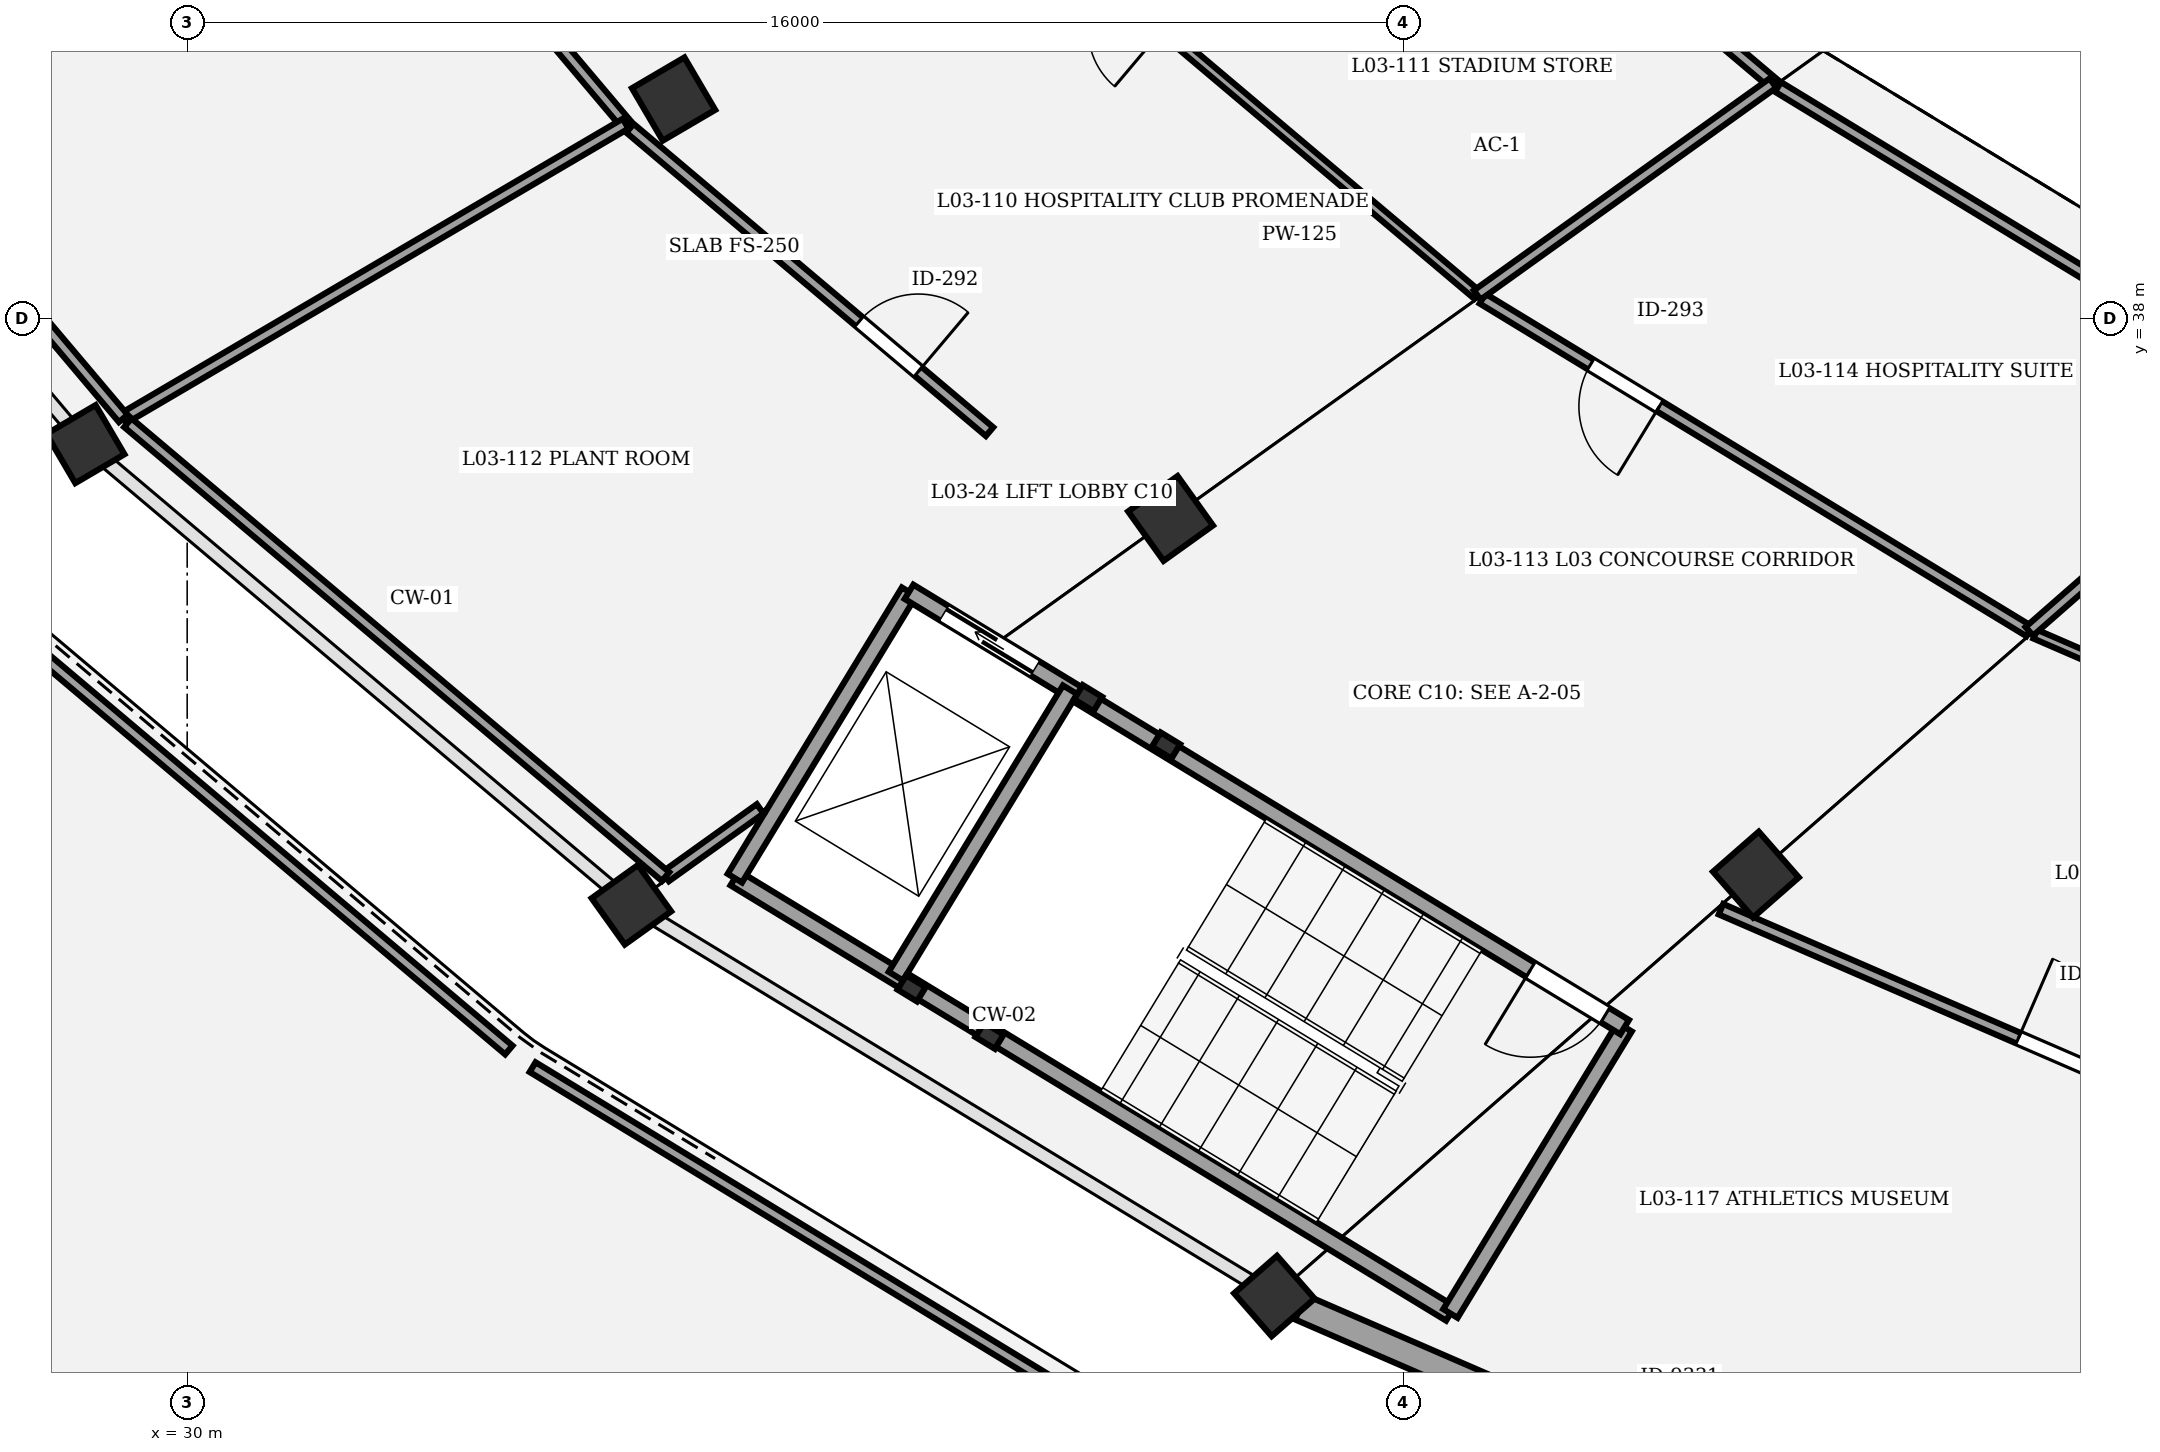
"""IFC4 building model, lengths in metres.
Left out: names, types, materials, properties, quantities, classifications, styles, units other than length and angle.
Written with IfcOpenShell. Run it as: python <this file> out.ifc"""

import sys

from ifc_helpers import new_model, si_unit, direction, frame, frame_2d, origin, origin_2d, place, context, subcontext, project, spatial, rectangle, extrude, element, fill, save


model = new_model("IFC4")
c1 = context("Model", 3, precision=1e-05, world=origin(), true_north=direction((0.0, 1.0)))
c2 = subcontext(c1, "Body", "Model", "MODEL_VIEW")
j1 = project(units=[si_unit("LENGTHUNIT", "METRE"), si_unit("PLANEANGLEUNIT", "RADIAN")], contexts=[c1])
p1 = place(None, origin())
s1 = spatial("IfcSite", under=j1, at=p1, CompositionType="ELEMENT")
p2 = place(p1, origin())
s2 = spatial("IfcBuilding", under=s1, at=p2, CompositionType="ELEMENT")
p3 = place(p2, frame((0.0, 0.0, 14.7)))
s3 = spatial("IfcBuildingStorey", under=s2, at=p3, CompositionType="ELEMENT", Elevation=14.7)
p4 = place(p3, frame((36.4, 40.886, 0.0), z_axis=(0.0, 0.0, 1.0), x_axis=(-0.862513669207, -0.506033764121, 0.0)))
e1 = element("IfcColumn", 1, at=p4, inside=s3, PredefinedType="COLUMN", context=c2, shape_type="SweptSolid", body=[
    extrude(rectangle(XDim=0.8, YDim=0.8, at=origin_2d()), origin(), (0.0, 0.0, 1.0), 4.5),
])
p5 = place(p3, frame((28.662, 36.346, 0.0), z_axis=(0.0, 0.0, 1.0), x_axis=(-0.862513669207, -0.506033764121, 0.0)))
e2 = element("IfcColumn", 2, at=p5, inside=s3, PredefinedType="COLUMN", context=c2, shape_type="SweptSolid", body=[
    extrude(rectangle(XDim=0.75, YDim=0.75, at=origin_2d()), origin(), (0.0, 0.0, 1.0), 4.5),
])
p6 = place(p3, frame((42.939, 35.368, 0.0), z_axis=(0.0, 0.0, 1.0), x_axis=(-0.812897512265, -0.582406760395, 0.0)))
e3 = element("IfcColumn", 3, at=p6, inside=s3, PredefinedType="COLUMN", context=c2, shape_type="SweptSolid", body=[
    extrude(rectangle(XDim=0.8, YDim=0.8, at=origin_2d()), origin(), (0.0, 0.0, 1.0), 4.5),
])
p7 = place(p3, frame((35.844, 30.285, 0.0), z_axis=(0.0, 0.0, 1.0), x_axis=(-0.812897512265, -0.582406760395, 0.0)))
e4 = element("IfcColumn", 4, at=p7, inside=s3, PredefinedType="COLUMN", context=c2, shape_type="SweptSolid", body=[
    extrude(rectangle(XDim=0.75, YDim=0.75, at=origin_2d()), origin(), (0.0, 0.0, 1.0), 4.5),
])
p8 = place(p3, frame((50.64, 30.683, 0.0), z_axis=(0.0, 0.0, 1.0), x_axis=(-0.752529860433, -0.658558128912, 0.0)))
e5 = element("IfcColumn", 5, at=p8, inside=s3, PredefinedType="COLUMN", context=c2, shape_type="SweptSolid", body=[
    extrude(rectangle(XDim=0.8, YDim=0.8, at=origin_2d()), origin(), (0.0, 0.0, 1.0), 4.5),
])
p9 = place(p3, frame((44.304, 25.139, 0.0), z_axis=(0.0, 0.0, 1.0), x_axis=(-0.752529860433, -0.658558128912, 0.0)))
e6 = element("IfcColumn", 6, at=p9, inside=s3, PredefinedType="COLUMN", context=c2, shape_type="SweptSolid", body=[
    extrude(rectangle(XDim=0.75, YDim=0.75, at=origin_2d()), origin(), (0.0, 0.0, 1.0), 4.5),
])
p10 = place(p3, frame((53.72, 21.057, 0.0), z_axis=(0.0, 0.0, 1.0), x_axis=(-0.917502782842, 0.397729359587, 0.0)))
e7 = element("IfcWall", 7, at=p10, inside=s3, PredefinedType="STANDARD", context=c2, shape_type="SweptSolid", body=[
    extrude(rectangle(XDim=9.89, YDim=0.35, at=frame_2d((4.945, 0.0))), origin(), (0.0, 0.0, 1.0), 3.42),
])
p11 = place(p10, frame((4.045, 0.0, 0.0)))
e8 = element("IfcOpeningElement", 8, at=p11, cuts=e7, PredefinedType="OPENING", context=c2, shape_type="SweptSolid", body=[
    extrude(rectangle(XDim=1.8, YDim=2.4, at=frame_2d((0.9, 1.2))), frame((0.0, 0.185, 0.0), z_axis=(0.0, -1.0, 0.0), x_axis=(1.0, 0.0, 0.0)), (0.0, 0.0, 1.0), 0.37),
])
for number, where, z_axis, x_axis in (
    (9, (42.879, 32.382, 0.0), (0.0, 0.0, 1.0), (-0.854, 0.52, 0.0)),
    (10, (41.854, 33.005, 0.0), (0.0, 0.0, 1.0), (-0.854, 0.52, 0.0)),
    (11, (39.531, 29.186, 0.0), (0.0, 0.0, 1.0), (-0.854, 0.52, 0.0)),
    (12, (40.556, 28.562, 0.0), (0.0, 0.0, 1.0), (-0.854, 0.52, 0.0)),
):
    element("IfcColumn", number, at=place(p3, frame(where, z_axis=z_axis, x_axis=x_axis)), inside=s3, PredefinedType="COLUMN", context=c2, shape_type="SweptSolid", body=[
        extrude(rectangle(XDim=0.3, YDim=0.22, at=origin_2d()), origin(), (0.0, 0.0, 1.0), 4.5),
    ])
p12 = place(p3, frame((46.621, 24.909, 0.0), z_axis=(0.0, 0.0, 1.0), x_axis=(-0.854373055797, 0.519660159651, 0.0)))
e13 = element("IfcWall", 13, at=p12, inside=s3, PredefinedType="SHEAR", context=c2, shape_type="SweptSolid", body=[
    extrude(rectangle(XDim=11.02, YDim=0.22, at=frame_2d((5.51, 0.0))), origin(), (0.0, 0.0, 1.0), 4.25),
])
p13 = place(p3, frame((48.913, 28.677, 0.0), z_axis=(0.0, 0.0, 1.0), x_axis=(-0.519729151243, -0.854331088834, 0.0)))
e14 = element("IfcWall", 14, at=p13, inside=s3, PredefinedType="SHEAR", context=c2, shape_type="SweptSolid", body=[
    extrude(rectangle(XDim=4.41, YDim=0.22, at=frame_2d((2.205, 0.0))), origin(), (0.0, 0.0, 1.0), 4.25),
])
p14 = place(p3, frame((39.497, 34.403, 0.0), z_axis=(0.0, 0.0, 1.0), x_axis=(-0.519664162523, -0.854370621095, 0.0)))
e15 = element("IfcWall", 15, at=p14, inside=s3, PredefinedType="SHEAR", context=c2, shape_type="SweptSolid", body=[
    extrude(rectangle(XDim=4.41, YDim=0.22, at=frame_2d((2.205, 0.0))), origin(), (0.0, 0.0, 1.0), 4.25),
])
p15 = place(p3, frame((48.913, 28.677, 0.0), z_axis=(0.0, 0.0, 1.0), x_axis=(-0.854369202373, 0.51966649501, 0.0)))
e16 = element("IfcWall", 16, at=p15, inside=s3, PredefinedType="SHEAR", context=c2, shape_type="SweptSolid", body=[
    extrude(rectangle(XDim=11.02, YDim=0.22, at=frame_2d((5.51, 0.0))), origin(), (0.0, 0.0, 1.0), 4.25),
])
p16 = place(p15, frame((0.3, 0.0, 0.0)))
e17 = element("IfcOpeningElement", 17, at=p16, cuts=e16, PredefinedType="OPENING", context=c2, shape_type="SweptSolid", body=[
    extrude(rectangle(XDim=1.15, YDim=2.15, at=frame_2d((0.575, 1.075))), frame((0.0, 0.12, 0.0), z_axis=(0.0, -1.0, 0.0), x_axis=(1.0, 0.0, 0.0)), (0.0, 0.0, 1.0), 0.24),
])
p17 = place(p15, frame((9.08, 0.0, 0.0)))
e18 = element("IfcOpeningElement", 18, at=p17, cuts=e16, PredefinedType="OPENING", context=c2, shape_type="SweptSolid", body=[
    extrude(rectangle(XDim=1.4, YDim=2.25, at=frame_2d((0.7, 1.125))), frame((0.0, 0.12, 0.0), z_axis=(0.0, -1.0, 0.0), x_axis=(1.0, 0.0, 0.0)), (0.0, 0.0, 1.0), 0.24),
])
p18 = place(p3, frame((41.616, 33.115, 0.0), z_axis=(0.0, 0.0, 1.0), x_axis=(-0.519664162523, -0.854370621095, 0.0)))
e19 = element("IfcWall", 19, at=p18, inside=s3, PredefinedType="SHEAR", context=c2, shape_type="SweptSolid", body=[
    extrude(rectangle(XDim=4.41, YDim=0.22, at=frame_2d((2.205, 0.0))), origin(), (0.0, 0.0, 1.0), 4.25),
])
p19 = place(p3, frame((30.405, 46.914, 0.0), z_axis=(0.0, 0.0, 1.0), x_axis=(0.64516519871, -0.76404310505, 0.0)))
e20 = element("IfcWall", 20, at=p19, inside=s3, PredefinedType="PARTITIONING", context=c2, shape_type="SweptSolid", body=[
    extrude(rectangle(XDim=8.313, YDim=0.15, at=frame_2d((4.157, 0.0))), origin(), (0.0, 0.0, 1.0), 3.25),
])
p20 = place(p19, frame((3.687, 0.0, 0.0)))
e21 = element("IfcOpeningElement", 21, at=p20, cuts=e20, PredefinedType="OPENING", context=c2, shape_type="SweptSolid", body=[
    extrude(rectangle(XDim=0.94, YDim=2.1, at=frame_2d((0.47, 1.05))), frame((0.0, 0.085, 0.0), z_axis=(0.0, -1.0, 0.0), x_axis=(1.0, 0.0, 0.0)), (0.0, 0.0, 1.0), 0.17),
])
p21 = place(p3, frame((46.973, 38.308, 0.0), z_axis=(0.0, 0.0, 1.0), x_axis=(-0.764249122867, 0.644921141068, 0.0)))
e22 = element("IfcWall", 22, at=p21, inside=s3, PredefinedType="PARTITIONING", context=c2, shape_type="SweptSolid", body=[
    extrude(rectangle(XDim=7.99, YDim=0.125, at=frame_2d((3.995, 0.0))), origin(), (0.0, 0.0, 1.0), 3.25),
])
p22 = place(p21, frame((5.416, 0.0, 0.0)))
e23 = element("IfcOpeningElement", 23, at=p22, cuts=e22, PredefinedType="OPENING", context=c2, shape_type="SweptSolid", body=[
    extrude(rectangle(XDim=0.98, YDim=2.1, at=frame_2d((0.49, 1.05))), frame((0.0, 0.073, 0.0), z_axis=(0.0, -1.0, 0.0), x_axis=(1.0, 0.0, 0.0)), (0.0, 0.0, 1.0), 0.145),
])
p23 = place(p3, frame((35.825, 40.503, 0.0), z_axis=(0.0, 0.0, 1.0), x_axis=(0.764269616674, -0.644896854565, 0.0)))
e24 = element("IfcWall", 24, at=p23, inside=s3, PredefinedType="PARTITIONING", context=c2, shape_type="SweptSolid", body=[
    extrude(rectangle(XDim=6.191, YDim=0.15, at=frame_2d((3.095, 0.0))), origin(), (0.0, 0.0, 1.0), 3.25),
])
p24 = place(p23, frame((3.945, 0.0, 0.0)))
e25 = element("IfcOpeningElement", 25, at=p24, cuts=e24, PredefinedType="OPENING", context=c2, shape_type="SweptSolid", body=[
    extrude(rectangle(XDim=1.02, YDim=2.1, at=frame_2d((0.51, 1.05))), frame((0.0, 0.085, 0.0), z_axis=(0.0, -1.0, 0.0), x_axis=(1.0, 0.0, 0.0)), (0.0, 0.0, 1.0), 0.17),
])
p25 = place(p3, frame((54.237, 33.884, 0.0), z_axis=(0.0, 0.0, 1.0), x_axis=(-0.854330104408, 0.519730769439, 0.0)))
e26 = element("IfcWall", 26, at=p25, inside=s3, PredefinedType="PARTITIONING", context=c2, shape_type="SweptSolid", body=[
    extrude(rectangle(XDim=8.42, YDim=0.15, at=frame_2d((4.21, 0.0))), origin(), (0.0, 0.0, 1.0), 3.25),
])
p26 = place(p25, frame((5.696, 0.0, 0.0)))
e27 = element("IfcOpeningElement", 27, at=p26, cuts=e26, PredefinedType="OPENING", context=c2, shape_type="SweptSolid", body=[
    extrude(rectangle(XDim=1.06, YDim=2.1, at=frame_2d((0.53, 1.05))), frame((0.0, 0.085, 0.0), z_axis=(0.0, -1.0, 0.0), x_axis=(1.0, 0.0, 0.0)), (0.0, 0.0, 1.0), 0.17),
])
p27 = place(p3, frame((62.618, 30.247, 0.0), z_axis=(0.0, 0.0, 1.0), x_axis=(-0.917494590455, 0.397748257677, 0.0)))
e28 = element("IfcWall", 28, at=p27, inside=s3, PredefinedType="PARTITIONING", context=c2, shape_type="SweptSolid", body=[
    extrude(rectangle(XDim=9.049, YDim=0.125, at=frame_2d((4.525, 0.0))), origin(), (0.0, 0.0, 1.0), 3.25),
])
p28 = place(p27, frame((6.167, 0.0, 0.0)))
e29 = element("IfcOpeningElement", 29, at=p28, cuts=e28, PredefinedType="OPENING", context=c2, shape_type="SweptSolid", body=[
    extrude(rectangle(XDim=1.1, YDim=2.1, at=frame_2d((0.55, 1.05))), frame((0.0, 0.073, 0.0), z_axis=(0.0, -1.0, 0.0), x_axis=(1.0, 0.0, 0.0)), (0.0, 0.0, 1.0), 0.145),
])
p29 = place(p3, frame((50.18, 30.228, 0.0), z_axis=(0.0, 0.0, 1.0), x_axis=(0.917508957037, -0.39771511633, 0.0)))
e30 = element("IfcWall", 30, at=p29, inside=s3, PredefinedType="PARTITIONING", context=c2, shape_type="SweptSolid", body=[
    extrude(rectangle(XDim=9.671, YDim=0.15, at=frame_2d((4.836, 0.0))), origin(), (0.0, 0.0, 1.0), 3.25),
])
p30 = place(p29, frame((4.266, 0.0, 0.0)))
e31 = element("IfcOpeningElement", 31, at=p30, cuts=e30, PredefinedType="OPENING", context=c2, shape_type="SweptSolid", body=[
    extrude(rectangle(XDim=1.14, YDim=2.1, at=frame_2d((0.57, 1.05))), frame((0.0, 0.085, 0.0), z_axis=(0.0, -1.0, 0.0), x_axis=(1.0, 0.0, 0.0)), (0.0, 0.0, 1.0), 0.17),
])
p31 = place(p3, frame((35.768, 40.562, 0.0), z_axis=(0.0, 0.0, 1.0), x_axis=(-0.862520085009, -0.506022828492, 0.0)))
e32 = element("IfcWall", 32, at=p31, inside=s3, PredefinedType="PARTITIONING", context=c2, shape_type="SweptSolid", body=[
    extrude(rectangle(XDim=7.663, YDim=0.15, at=frame_2d((3.831, 0.0))), origin(), (0.0, 0.0, 1.0), 3.25),
])
p32 = place(p3, frame((29.159, 36.685, 0.0), z_axis=(0.0, 0.0, 1.0), x_axis=(-0.645166061073, 0.764042376861, 0.0)))
e33 = element("IfcWall", 33, at=p32, inside=s3, PredefinedType="PARTITIONING", context=c2, shape_type="SweptSolid", body=[
    extrude(rectangle(XDim=9.014, YDim=0.15, at=frame_2d((4.507, 0.0))), origin(), (0.0, 0.0, 1.0), 3.25),
])
p33 = place(p3, frame((45.111, 45.951, 0.0), z_axis=(0.0, 0.0, 1.0), x_axis=(0.764259013583, -0.644909420118, 0.0)))
e34 = element("IfcWall", 34, at=p33, inside=s3, PredefinedType="PARTITIONING", context=c2, shape_type="SweptSolid", body=[
    extrude(rectangle(XDim=7.528, YDim=0.15, at=frame_2d((3.764, 0.0))), origin(), (0.0, 0.0, 1.0), 3.25),
])
p34 = place(p3, frame((50.864, 41.096, 0.0), z_axis=(0.0, 0.0, 1.0), x_axis=(-0.812877901281, -0.582434131563, 0.0)))
e35 = element("IfcWall", 35, at=p34, inside=s3, PredefinedType="PARTITIONING", context=c2, shape_type="SweptSolid", body=[
    extrude(rectangle(XDim=4.787, YDim=0.15, at=frame_2d((2.393, 0.0))), origin(), (0.0, 0.0, 1.0), 3.25),
])
p35 = place(p3, frame((37.538, 31.548, 0.0), z_axis=(0.0, 0.0, 1.0), x_axis=(-0.812848600764, -0.582475022844, 0.0)))
e36 = element("IfcWall", 36, at=p35, inside=s3, PredefinedType="PARTITIONING", context=c2, shape_type="SweptSolid", body=[
    extrude(rectangle(XDim=1.53, YDim=0.15, at=frame_2d((0.765, 0.0))), origin(), (0.0, 0.0, 1.0), 3.25),
])
p36 = place(p3, frame((36.294, 30.657, 0.0), z_axis=(0.0, 0.0, 1.0), x_axis=(-0.764252893528, 0.644916672706, 0.0)))
e37 = element("IfcWall", 37, at=p36, inside=s3, PredefinedType="PARTITIONING", context=c2, shape_type="SweptSolid", body=[
    extrude(rectangle(XDim=9.257, YDim=0.15, at=frame_2d((4.629, 0.0))), origin(), (0.0, 0.0, 1.0), 3.25),
])
p37 = place(p3, frame((50.931, 41.045, 0.0), z_axis=(0.0, 0.0, 1.0), x_axis=(0.854324504961, -0.519739973663, 0.0)))
e38 = element("IfcWall", 38, at=p37, inside=s3, PredefinedType="PARTITIONING", context=c2, shape_type="SweptSolid", body=[
    extrude(rectangle(XDim=7.934, YDim=0.15, at=frame_2d((3.967, 0.0))), origin(), (0.0, 0.0, 1.0), 3.25),
])
p38 = place(p3, frame((57.709, 36.922, 0.0), z_axis=(0.0, 0.0, 1.0), x_axis=(-0.75256358092, -0.658519594753, 0.0)))
e39 = element("IfcWall", 39, at=p38, inside=s3, PredefinedType="PARTITIONING", context=c2, shape_type="SweptSolid", body=[
    extrude(rectangle(XDim=4.613, YDim=0.15, at=frame_2d((2.307, 0.0))), origin(), (0.0, 0.0, 1.0), 3.25),
])
p39 = place(p3, frame((59.054, 26.381, 0.0), z_axis=(0.0, 0.0, 1.0), x_axis=(-0.677844539823, -0.735205263741, 0.0)))
e40 = element("IfcWall", 40, at=p39, inside=s3, PredefinedType="PARTITIONING", context=c2, shape_type="SweptSolid", body=[
    extrude(rectangle(XDim=6.87, YDim=0.15, at=frame_2d((3.435, 0.0))), origin(), (0.0, 0.0, 1.0), 3.25),
])
p40 = place(p3, frame((27.049, 34.436, 0.0), z_axis=(0.0, 0.0, 1.0), x_axis=(0.76426547638, -0.644901761212, 0.0)))
e41 = element("IfcWall", 41, at=p40, inside=s3, PredefinedType="PARTITIONING", context=c2, shape_type="SweptSolid", body=[
    extrude(rectangle(XDim=9.398, YDim=0.15, at=frame_2d((4.699, 0.0))), origin(), (0.0, 0.0, 1.0), 3.25),
])
p41 = place(p3, frame((34.545, 28.15, 0.0), z_axis=(0.0, 0.0, 1.0), x_axis=(0.854333268174, -0.519725568826, 0.0)))
e42 = element("IfcWall", 42, at=p41, inside=s3, PredefinedType="PARTITIONING", context=c2, shape_type="SweptSolid", body=[
    extrude(rectangle(XDim=9.902, YDim=0.15, at=frame_2d((4.951, 0.0))), origin(), (0.0, 0.0, 1.0), 3.25),
])
p42 = place(p16, origin())
e43 = element("IfcDoor", 43, at=p42, inside=s3, OperationType="SINGLE_SWING_RIGHT", PredefinedType="DOOR", context=c2, shape_type="SweptSolid", body=[
    extrude(rectangle(XDim=1.15, YDim=2.15, at=frame_2d((0.575, 1.075))), frame((0.0, 0.025, 0.0), z_axis=(0.0, -1.0, 0.0), x_axis=(1.0, 0.0, 0.0)), (0.0, 0.0, 1.0), 0.05),
])
fill(e17, e43)
p43 = place(p17, origin())
e44 = element("IfcDoor", 44, at=p43, inside=s3, OperationType="DOUBLE_DOOR_SLIDING", PredefinedType="DOOR", context=c2, shape_type="SweptSolid", body=[
    extrude(rectangle(XDim=1.4, YDim=2.25, at=frame_2d((0.7, 1.125))), frame((0.0, 0.025, 0.0), z_axis=(0.0, -1.0, 0.0), x_axis=(1.0, 0.0, 0.0)), (0.0, 0.0, 1.0), 0.05),
])
fill(e18, e44)
p44 = place(p24, origin())
e45 = element("IfcDoor", 45, at=p44, inside=s3, OperationType="SINGLE_SWING_RIGHT", PredefinedType="DOOR", context=c2, shape_type="SweptSolid", body=[
    extrude(rectangle(XDim=1.02, YDim=2.1, at=frame_2d((0.51, 1.05))), frame((0.0, 0.025, 0.0), z_axis=(0.0, -1.0, 0.0), x_axis=(1.0, 0.0, 0.0)), (0.0, 0.0, 1.0), 0.05),
])
fill(e25, e45)
p45 = place(p26, origin())
e46 = element("IfcDoor", 46, at=p45, inside=s3, OperationType="SINGLE_SWING_LEFT", PredefinedType="DOOR", context=c2, shape_type="SweptSolid", body=[
    extrude(rectangle(XDim=1.06, YDim=2.1, at=frame_2d((0.53, 1.05))), frame((0.0, 0.025, 0.0), z_axis=(0.0, -1.0, 0.0), x_axis=(1.0, 0.0, 0.0)), (0.0, 0.0, 1.0), 0.05),
])
fill(e27, e46)
p46 = place(p30, origin())
e47 = element("IfcDoor", 47, at=p46, inside=s3, OperationType="SINGLE_SWING_LEFT", PredefinedType="DOOR", context=c2, shape_type="SweptSolid", body=[
    extrude(rectangle(XDim=1.14, YDim=2.1, at=frame_2d((0.57, 1.05))), frame((0.0, 0.025, 0.0), z_axis=(0.0, -1.0, 0.0), x_axis=(1.0, 0.0, 0.0)), (0.0, 0.0, 1.0), 0.05),
])
fill(e31, e47)
save(model, sys.argv[1])
